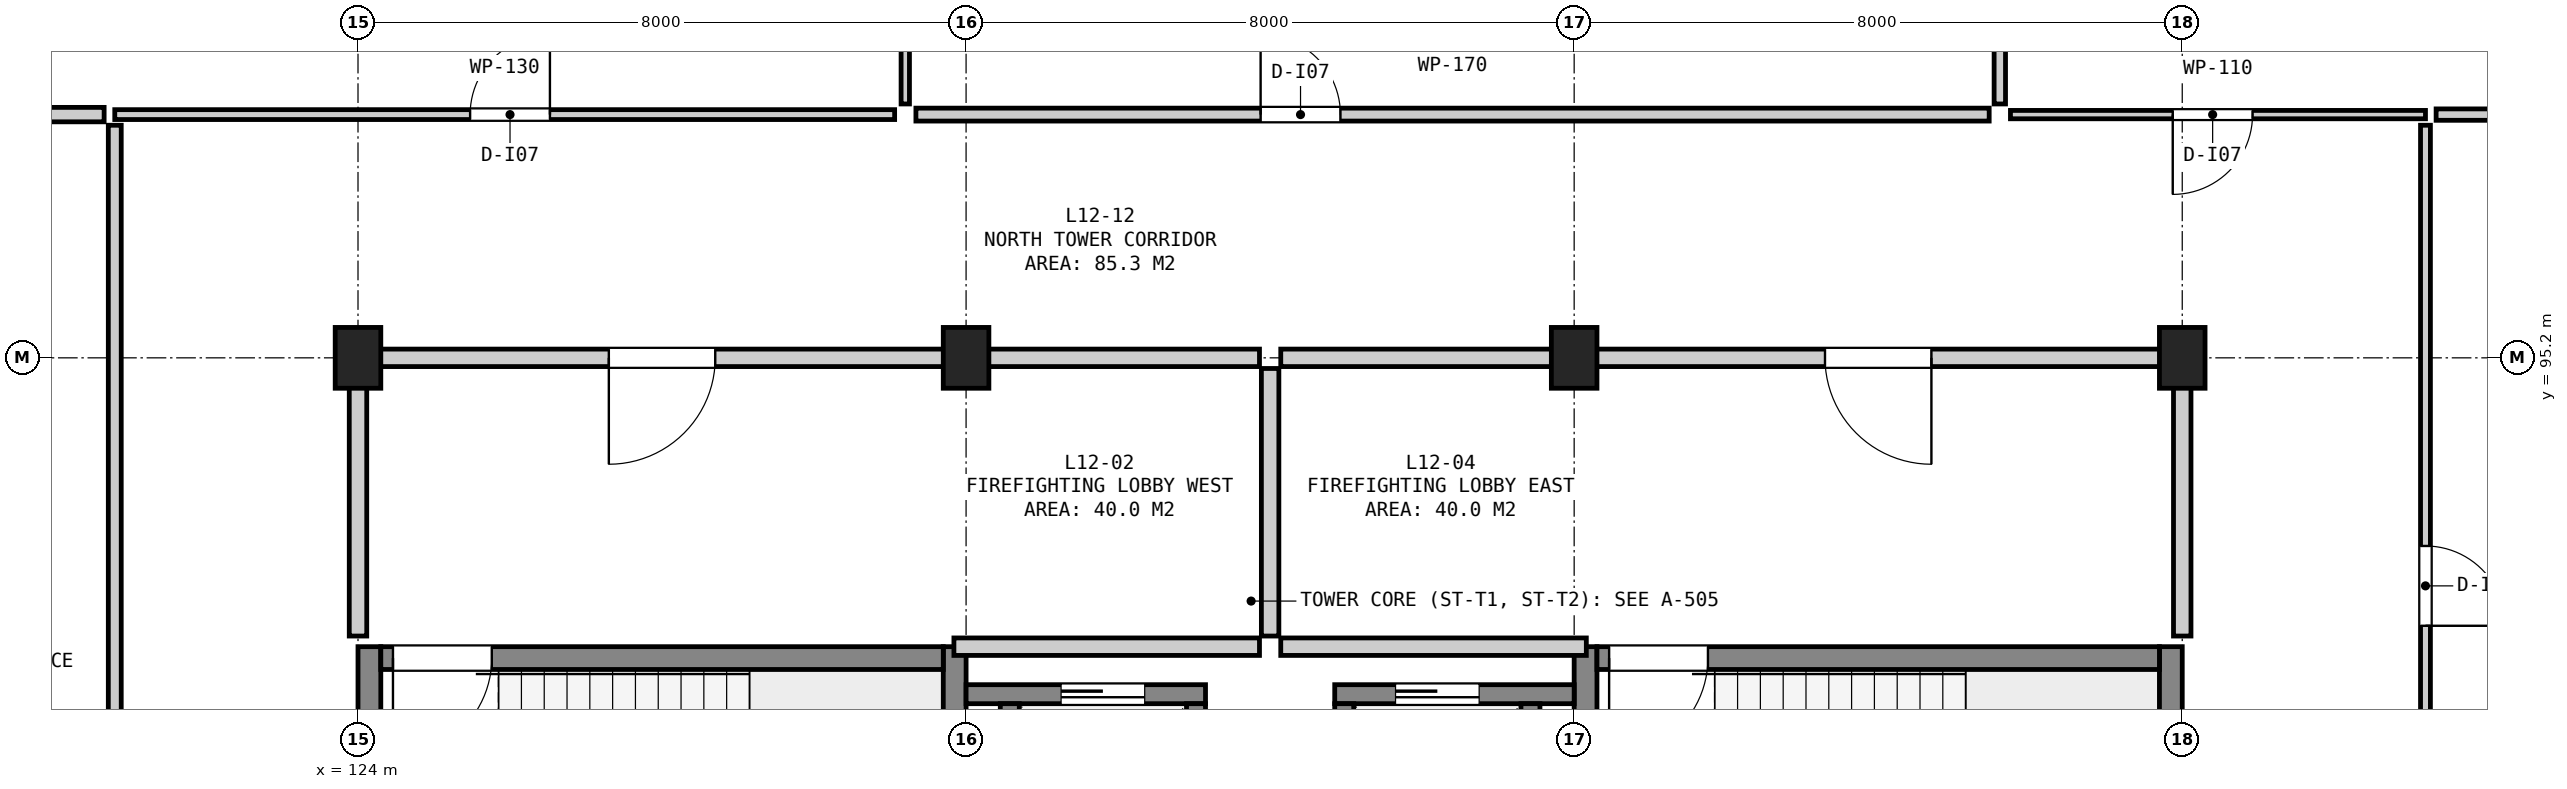
"""IFC4 building model, lengths in metres.
Left out: names, types, materials, properties, quantities, classifications, styles, units other than length and angle.
Written with IfcOpenShell. Run it as: python <this file> out.ifc"""

import sys

from ifc_helpers import new_model, si_unit, direction, frame, frame_2d, origin, origin_2d, place, context, subcontext, project, spatial, rectangle, extrude, element, fill, save


model = new_model("IFC4")
c1 = context("Model", 3, precision=1e-05, world=origin(), true_north=direction((0.0, 1.0)))
c2 = subcontext(c1, "Body", "Model", "MODEL_VIEW")
j1 = project(units=[si_unit("LENGTHUNIT", "METRE"), si_unit("PLANEANGLEUNIT", "RADIAN")], contexts=[c1])
p1 = place(None, origin())
s1 = spatial("IfcSite", under=j1, at=p1, CompositionType="ELEMENT")
p2 = place(p1, origin())
s2 = spatial("IfcBuilding", under=s1, at=p2, CompositionType="ELEMENT")
p3 = place(p2, frame((0.0, 0.0, 50.9)))
s3 = spatial("IfcBuildingStorey", under=s2, at=p3, CompositionType="ELEMENT", Elevation=50.9)
for number, where, z_axis, x_axis in (
    (1, (124.0, 95.2, 0.0), (0.0, 0.0, 1.0), (1.0, 0.0, 0.0)),
    (2, (132.0, 95.2, 0.0), (0.0, 0.0, 1.0), (1.0, 0.0, 0.0)),
    (3, (140.0, 95.2, 0.0), (0.0, 0.0, 1.0), (1.0, 0.0, 0.0)),
    (4, (148.0, 95.2, 0.0), (0.0, 0.0, 1.0), (1.0, 0.0, 0.0)),
):
    element("IfcColumn", number, at=place(p3, frame(where, z_axis=z_axis, x_axis=x_axis)), inside=s3, PredefinedType="COLUMN", context=c2, shape_type="SweptSolid", body=[
        extrude(rectangle(XDim=0.6, YDim=0.8, at=origin_2d()), origin(), (0.0, 0.0, 1.0), 3.9),
    ])
for number, where, z_axis, x_axis in (
    (5, (124.15, 87.2, 0.0), (0.0, 0.0, 1.0), (0.0, 1.0, 0.0)),
    (6, (131.85, 87.2, 0.0), (0.0, 0.0, 1.0), (0.0, 1.0, 0.0)),
):
    element("IfcWall", number, at=place(p3, frame(where, z_axis=z_axis, x_axis=x_axis)), inside=s3, PredefinedType="SHEAR", context=c2, shape_type="SweptSolid", body=[
        extrude(rectangle(XDim=4.2, YDim=0.3, at=frame_2d((2.1, 0.0))), origin(), (0.0, 0.0, 1.0), 3.62),
    ])
p4 = place(p3, frame((124.3, 91.25, 0.0), z_axis=(0.0, 0.0, 1.0), x_axis=(1.0, 0.0, 0.0)))
e7 = element("IfcWall", 7, at=p4, inside=s3, PredefinedType="SHEAR", context=c2, shape_type="SweptSolid", body=[
    extrude(rectangle(XDim=7.4, YDim=0.3, at=frame_2d((3.7, 0.0))), origin(), (0.0, 0.0, 1.0), 3.62),
])
p5 = place(p4, frame((0.16, 0.0, 0.0)))
e8 = element("IfcOpeningElement", 8, at=p5, cuts=e7, PredefinedType="OPENING", context=c2, shape_type="SweptSolid", body=[
    extrude(rectangle(XDim=1.3, YDim=2.18, at=frame_2d((0.65, 1.09))), frame((0.0, 0.162, 0.0), z_axis=(0.0, -1.0, 0.0), x_axis=(1.0, 0.0, 0.0)), (0.0, 0.0, 1.0), 0.324),
])
for number, where, z_axis, x_axis in (
    (9, (140.15, 87.2, 0.0), (0.0, 0.0, 1.0), (0.0, 1.0, 0.0)),
    (10, (147.85, 87.2, 0.0), (0.0, 0.0, 1.0), (0.0, 1.0, 0.0)),
):
    element("IfcWall", number, at=place(p3, frame(where, z_axis=z_axis, x_axis=x_axis)), inside=s3, PredefinedType="SHEAR", context=c2, shape_type="SweptSolid", body=[
        extrude(rectangle(XDim=4.2, YDim=0.3, at=frame_2d((2.1, 0.0))), origin(), (0.0, 0.0, 1.0), 3.62),
    ])
p6 = place(p3, frame((140.3, 91.25, 0.0), z_axis=(0.0, 0.0, 1.0), x_axis=(1.0, 0.0, 0.0)))
e11 = element("IfcWall", 11, at=p6, inside=s3, PredefinedType="SHEAR", context=c2, shape_type="SweptSolid", body=[
    extrude(rectangle(XDim=7.4, YDim=0.3, at=frame_2d((3.7, 0.0))), origin(), (0.0, 0.0, 1.0), 3.62),
])
p7 = place(p6, frame((0.16, 0.0, 0.0)))
e12 = element("IfcOpeningElement", 12, at=p7, cuts=e11, PredefinedType="OPENING", context=c2, shape_type="SweptSolid", body=[
    extrude(rectangle(XDim=1.3, YDim=2.18, at=frame_2d((0.65, 1.09))), frame((0.0, 0.162, 0.0), z_axis=(0.0, -1.0, 0.0), x_axis=(1.0, 0.0, 0.0)), (0.0, 0.0, 1.0), 0.324),
])
p8 = place(p3, frame((132.0, 90.775, 0.0), z_axis=(0.0, 0.0, 1.0), x_axis=(1.0, 0.0, 0.0)))
e13 = element("IfcWall", 13, at=p8, inside=s3, PredefinedType="SHEAR", context=c2, shape_type="SweptSolid", body=[
    extrude(rectangle(XDim=3.15, YDim=0.25, at=frame_2d((1.575, 0.0))), origin(), (0.0, 0.0, 1.0), 3.62),
])
p9 = place(p8, frame((1.25, 0.0, 0.0)))
e14 = element("IfcOpeningElement", 14, at=p9, cuts=e13, PredefinedType="OPENING", context=c2, shape_type="SweptSolid", body=[
    extrude(rectangle(XDim=1.1, YDim=2.15, at=frame_2d((0.55, 1.075))), frame((0.0, 0.137, 0.0), z_axis=(0.0, -1.0, 0.0), x_axis=(1.0, 0.0, 0.0)), (0.0, 0.0, 1.0), 0.274),
])
for number, where, z_axis, x_axis in (
    (15, (132.575, 87.75, 0.0), (0.0, 0.0, 1.0), (0.0, 1.0, 0.0)),
    (16, (135.025, 87.75, 0.0), (0.0, 0.0, 1.0), (0.0, 1.0, 0.0)),
):
    element("IfcWall", number, at=place(p3, frame(where, z_axis=z_axis, x_axis=x_axis)), inside=s3, PredefinedType="SHEAR", context=c2, shape_type="SweptSolid", body=[
        extrude(rectangle(XDim=2.9, YDim=0.25, at=frame_2d((1.45, 0.0))), origin(), (0.0, 0.0, 1.0), 3.62),
    ])
p10 = place(p3, frame((136.85, 90.775, 0.0), z_axis=(0.0, 0.0, 1.0), x_axis=(1.0, 0.0, 0.0)))
e17 = element("IfcWall", 17, at=p10, inside=s3, PredefinedType="SHEAR", context=c2, shape_type="SweptSolid", body=[
    extrude(rectangle(XDim=3.15, YDim=0.25, at=frame_2d((1.575, 0.0))), origin(), (0.0, 0.0, 1.0), 3.62),
])
p11 = place(p10, frame((0.8, 0.0, 0.0)))
e18 = element("IfcOpeningElement", 18, at=p11, cuts=e17, PredefinedType="OPENING", context=c2, shape_type="SweptSolid", body=[
    extrude(rectangle(XDim=1.1, YDim=2.15, at=frame_2d((0.55, 1.075))), frame((0.0, 0.137, 0.0), z_axis=(0.0, -1.0, 0.0), x_axis=(1.0, 0.0, 0.0)), (0.0, 0.0, 1.0), 0.274),
])
for number, where, z_axis, x_axis in (
    (19, (136.975, 87.75, 0.0), (0.0, 0.0, 1.0), (0.0, 1.0, 0.0)),
    (20, (139.425, 87.75, 0.0), (0.0, 0.0, 1.0), (0.0, 1.0, 0.0)),
):
    element("IfcWall", number, at=place(p3, frame(where, z_axis=z_axis, x_axis=x_axis)), inside=s3, PredefinedType="SHEAR", context=c2, shape_type="SweptSolid", body=[
        extrude(rectangle(XDim=2.9, YDim=0.25, at=frame_2d((1.45, 0.0))), origin(), (0.0, 0.0, 1.0), 3.62),
    ])
p12 = place(p3, frame((131.84, 91.4, 0.0), z_axis=(0.0, 0.0, 1.0), x_axis=(1.0, 0.0, 0.0)))
e21 = element("IfcWall", 21, at=p12, inside=s3, PredefinedType="SOLIDWALL", context=c2, shape_type="SweptSolid", body=[
    extrude(rectangle(XDim=4.02, YDim=0.23, at=frame_2d((2.01, 0.0))), origin(), (0.0, 0.0, 1.0), 3.62),
])
p13 = place(p3, frame((124.14, 95.2, 0.0), z_axis=(0.0, 0.0, 1.0), x_axis=(1.0, 0.0, 0.0)))
e22 = element("IfcWall", 22, at=p13, inside=s3, PredefinedType="SOLIDWALL", context=c2, shape_type="SweptSolid", body=[
    extrude(rectangle(XDim=11.72, YDim=0.23, at=frame_2d((5.86, 0.0))), origin(), (0.0, 0.0, 1.0), 3.005),
])
p14 = place(p13, frame((3.16, 0.0, 0.0)))
e23 = element("IfcOpeningElement", 23, at=p14, cuts=e22, PredefinedType="OPENING", context=c2, shape_type="SweptSolid", body=[
    extrude(rectangle(XDim=1.4, YDim=2.2, at=frame_2d((0.7, 1.1))), frame((0.0, 0.127, 0.0), z_axis=(0.0, -1.0, 0.0), x_axis=(1.0, 0.0, 0.0)), (0.0, 0.0, 1.0), 0.254),
])
p15 = place(p3, frame((124.0, 91.54, 0.0), z_axis=(0.0, 0.0, 1.0), x_axis=(0.0, 1.0, 0.0)))
e24 = element("IfcWall", 24, at=p15, inside=s3, PredefinedType="SOLIDWALL", context=c2, shape_type="SweptSolid", body=[
    extrude(rectangle(XDim=3.52, YDim=0.23, at=frame_2d((1.76, 0.0))), origin(), (0.0, 0.0, 1.0), 3.055),
])
p16 = place(p3, frame((136.0, 91.54, 0.0), z_axis=(0.0, 0.0, 1.0), x_axis=(0.0, 1.0, 0.0)))
e25 = element("IfcWall", 25, at=p16, inside=s3, PredefinedType="SOLIDWALL", context=c2, shape_type="SweptSolid", body=[
    extrude(rectangle(XDim=3.52, YDim=0.23, at=frame_2d((1.76, 0.0))), origin(), (0.0, 0.0, 1.0), 3.62),
])
p17 = place(p3, frame((136.14, 91.4, 0.0), z_axis=(0.0, 0.0, 1.0), x_axis=(1.0, 0.0, 0.0)))
e26 = element("IfcWall", 26, at=p17, inside=s3, PredefinedType="SOLIDWALL", context=c2, shape_type="SweptSolid", body=[
    extrude(rectangle(XDim=4.02, YDim=0.23, at=frame_2d((2.01, 0.0))), origin(), (0.0, 0.0, 1.0), 3.62),
])
p18 = place(p3, frame((136.14, 95.2, 0.0), z_axis=(0.0, 0.0, 1.0), x_axis=(1.0, 0.0, 0.0)))
e27 = element("IfcWall", 27, at=p18, inside=s3, PredefinedType="SOLIDWALL", context=c2, shape_type="SweptSolid", body=[
    extrude(rectangle(XDim=11.72, YDim=0.23, at=frame_2d((5.86, 0.0))), origin(), (0.0, 0.0, 1.0), 3.055),
])
p19 = place(p18, frame((7.16, 0.0, 0.0)))
e28 = element("IfcOpeningElement", 28, at=p19, cuts=e27, PredefinedType="OPENING", context=c2, shape_type="SweptSolid", body=[
    extrude(rectangle(XDim=1.4, YDim=2.2, at=frame_2d((0.7, 1.1))), frame((0.0, 0.127, 0.0), z_axis=(0.0, -1.0, 0.0), x_axis=(1.0, 0.0, 0.0)), (0.0, 0.0, 1.0), 0.254),
])
p20 = place(p3, frame((148.0, 91.54, 0.0), z_axis=(0.0, 0.0, 1.0), x_axis=(0.0, 1.0, 0.0)))
e29 = element("IfcWall", 29, at=p20, inside=s3, PredefinedType="SOLIDWALL", context=c2, shape_type="SweptSolid", body=[
    extrude(rectangle(XDim=3.52, YDim=0.23, at=frame_2d((1.76, 0.0))), origin(), (0.0, 0.0, 1.0), 3.155),
])
p21 = place(p3, frame((151.34, 98.4, 0.0), z_axis=(0.0, 0.0, 1.0), x_axis=(1.0, 0.0, 0.0)))
e30 = element("IfcWall", 30, at=p21, inside=s3, PredefinedType="PARTITIONING", context=c2, shape_type="SweptSolid", body=[
    extrude(rectangle(XDim=16.565, YDim=0.15, at=frame_2d((8.282, 0.0))), origin(), (0.0, 0.0, 1.0), 3.62),
])
p22 = place(p3, frame((151.2, 86.54, 0.0), z_axis=(0.0, 0.0, 1.0), x_axis=(0.0, 1.0, 0.0)))
e31 = element("IfcWall", 31, at=p22, inside=s3, PredefinedType="PARTITIONING", context=c2, shape_type="SweptSolid", body=[
    extrude(rectangle(XDim=11.72, YDim=0.13, at=frame_2d((5.86, 0.0))), origin(), (0.0, 0.0, 1.0), 3.62),
])
p23 = place(p22, frame((5.135, 0.0, 0.0)))
e32 = element("IfcOpeningElement", 32, at=p23, cuts=e31, PredefinedType="OPENING", context=c2, shape_type="SweptSolid", body=[
    extrude(rectangle(XDim=1.05, YDim=2.15, at=frame_2d((0.525, 1.075))), frame((0.0, 0.077, 0.0), z_axis=(0.0, -1.0, 0.0), x_axis=(1.0, 0.0, 0.0)), (0.0, 0.0, 1.0), 0.154),
])
p24 = place(p3, frame((116.895, 98.4, 0.0), z_axis=(0.0, 0.0, 1.0), x_axis=(1.0, 0.0, 0.0)))
e33 = element("IfcWall", 33, at=p24, inside=s3, PredefinedType="PARTITIONING", context=c2, shape_type="SweptSolid", body=[
    extrude(rectangle(XDim=3.765, YDim=0.19, at=frame_2d((1.882, 0.0))), origin(), (0.0, 0.0, 1.0), 3.62),
])
p25 = place(p3, frame((120.8, 76.14, 0.0), z_axis=(0.0, 0.0, 1.0), x_axis=(0.0, 1.0, 0.0)))
e34 = element("IfcWall", 34, at=p25, inside=s3, PredefinedType="PARTITIONING", context=c2, shape_type="SweptSolid", body=[
    extrude(rectangle(XDim=22.12, YDim=0.17, at=frame_2d((11.06, 0.0))), origin(), (0.0, 0.0, 1.0), 3.62),
])
p26 = place(p25, frame((6.535, 0.0, 0.0)))
e35 = element("IfcOpeningElement", 35, at=p26, cuts=e34, PredefinedType="OPENING", context=c2, shape_type="SweptSolid", body=[
    extrude(rectangle(XDim=1.05, YDim=2.15, at=frame_2d((0.525, 1.075))), frame((0.0, 0.097, 0.0), z_axis=(0.0, -1.0, 0.0), x_axis=(1.0, 0.0, 0.0)), (0.0, 0.0, 1.0), 0.194),
])
p27 = place(p3, frame((120.8, 98.4, 0.0), z_axis=(0.0, 0.0, 1.0), x_axis=(1.0, 0.0, 0.0)))
e36 = element("IfcWall", 36, at=p27, inside=s3, PredefinedType="PARTITIONING", context=c2, shape_type="SweptSolid", body=[
    extrude(rectangle(XDim=10.26, YDim=0.13, at=frame_2d((5.13, 0.0))), origin(), (0.0, 0.0, 1.0), 3.62),
])
p28 = place(p27, frame((4.675, 0.0, 0.0)))
e37 = element("IfcOpeningElement", 37, at=p28, cuts=e36, PredefinedType="OPENING", context=c2, shape_type="SweptSolid", body=[
    extrude(rectangle(XDim=1.05, YDim=2.15, at=frame_2d((0.525, 1.075))), frame((0.0, 0.077, 0.0), z_axis=(0.0, -1.0, 0.0), x_axis=(1.0, 0.0, 0.0)), (0.0, 0.0, 1.0), 0.154),
])
p29 = place(p3, frame((131.2, 98.54, 0.0), z_axis=(0.0, 0.0, 1.0), x_axis=(0.0, 1.0, 0.0)))
e38 = element("IfcWall", 38, at=p29, inside=s3, PredefinedType="PARTITIONING", context=c2, shape_type="SweptSolid", body=[
    extrude(rectangle(XDim=16.565, YDim=0.11, at=frame_2d((8.282, 0.0))), origin(), (0.0, 0.0, 1.0), 3.62),
])
p30 = place(p3, frame((131.34, 98.4, 0.0), z_axis=(0.0, 0.0, 1.0), x_axis=(1.0, 0.0, 0.0)))
e39 = element("IfcWall", 39, at=p30, inside=s3, PredefinedType="PARTITIONING", context=c2, shape_type="SweptSolid", body=[
    extrude(rectangle(XDim=14.12, YDim=0.17, at=frame_2d((7.06, 0.0))), origin(), (0.0, 0.0, 1.0), 3.62),
])
p31 = place(p30, frame((4.535, 0.0, 0.0)))
e40 = element("IfcOpeningElement", 40, at=p31, cuts=e39, PredefinedType="OPENING", context=c2, shape_type="SweptSolid", body=[
    extrude(rectangle(XDim=1.05, YDim=2.15, at=frame_2d((0.525, 1.075))), frame((0.0, 0.097, 0.0), z_axis=(0.0, -1.0, 0.0), x_axis=(1.0, 0.0, 0.0)), (0.0, 0.0, 1.0), 0.194),
])
p32 = place(p3, frame((145.6, 98.54, 0.0), z_axis=(0.0, 0.0, 1.0), x_axis=(0.0, 1.0, 0.0)))
e41 = element("IfcWall", 41, at=p32, inside=s3, PredefinedType="PARTITIONING", context=c2, shape_type="SweptSolid", body=[
    extrude(rectangle(XDim=16.565, YDim=0.15, at=frame_2d((8.282, 0.0))), origin(), (0.0, 0.0, 1.0), 3.62),
])
p33 = place(p3, frame((145.74, 98.4, 0.0), z_axis=(0.0, 0.0, 1.0), x_axis=(1.0, 0.0, 0.0)))
e42 = element("IfcWall", 42, at=p33, inside=s3, PredefinedType="PARTITIONING", context=c2, shape_type="SweptSolid", body=[
    extrude(rectangle(XDim=5.46, YDim=0.11, at=frame_2d((2.73, 0.0))), origin(), (0.0, 0.0, 1.0), 3.62),
])
p34 = place(p33, frame((2.135, 0.0, 0.0)))
e43 = element("IfcOpeningElement", 43, at=p34, cuts=e42, PredefinedType="OPENING", context=c2, shape_type="SweptSolid", body=[
    extrude(rectangle(XDim=1.05, YDim=2.15, at=frame_2d((0.525, 1.075))), frame((0.0, 0.067, 0.0), z_axis=(0.0, -1.0, 0.0), x_axis=(1.0, 0.0, 0.0)), (0.0, 0.0, 1.0), 0.134),
])
p35 = place(p5, frame((1.3, 0.0, 0.0), z_axis=(0.0, 0.0, 1.0), x_axis=(-1.0, 0.0, 0.0)))
e44 = element("IfcDoor", 44, at=p35, inside=s3, OperationType="SINGLE_SWING_RIGHT", PredefinedType="DOOR", context=c2, shape_type="SweptSolid", body=[
    extrude(rectangle(XDim=1.3, YDim=2.18, at=frame_2d((0.65, 1.09))), frame((0.0, 0.025, 0.0), z_axis=(0.0, -1.0, 0.0), x_axis=(1.0, 0.0, 0.0)), (0.0, 0.0, 1.0), 0.05),
])
fill(e8, e44)
p36 = place(p7, frame((1.3, 0.0, 0.0), z_axis=(0.0, 0.0, 1.0), x_axis=(-1.0, 0.0, 0.0)))
e45 = element("IfcDoor", 45, at=p36, inside=s3, OperationType="SINGLE_SWING_RIGHT", PredefinedType="DOOR", context=c2, shape_type="SweptSolid", body=[
    extrude(rectangle(XDim=1.3, YDim=2.18, at=frame_2d((0.65, 1.09))), frame((0.0, 0.025, 0.0), z_axis=(0.0, -1.0, 0.0), x_axis=(1.0, 0.0, 0.0)), (0.0, 0.0, 1.0), 0.05),
])
fill(e12, e45)
p37 = place(p9, origin())
e46 = element("IfcDoor", 46, at=p37, inside=s3, OperationType="SLIDING_TO_LEFT", PredefinedType="DOOR", context=c2, shape_type="SweptSolid", body=[
    extrude(rectangle(XDim=1.1, YDim=2.15, at=frame_2d((0.55, 1.075))), frame((0.0, 0.025, 0.0), z_axis=(0.0, -1.0, 0.0), x_axis=(1.0, 0.0, 0.0)), (0.0, 0.0, 1.0), 0.05),
])
fill(e14, e46)
p38 = place(p11, origin())
e47 = element("IfcDoor", 47, at=p38, inside=s3, OperationType="SLIDING_TO_LEFT", PredefinedType="DOOR", context=c2, shape_type="SweptSolid", body=[
    extrude(rectangle(XDim=1.1, YDim=2.15, at=frame_2d((0.55, 1.075))), frame((0.0, 0.025, 0.0), z_axis=(0.0, -1.0, 0.0), x_axis=(1.0, 0.0, 0.0)), (0.0, 0.0, 1.0), 0.05),
])
fill(e18, e47)
p39 = place(p14, frame((1.4, 0.0, 0.0), z_axis=(0.0, 0.0, 1.0), x_axis=(-1.0, 0.0, 0.0)))
e48 = element("IfcDoor", 48, at=p39, inside=s3, OperationType="SINGLE_SWING_RIGHT", PredefinedType="DOOR", context=c2, shape_type="SweptSolid", body=[
    extrude(rectangle(XDim=1.4, YDim=2.2, at=frame_2d((0.7, 1.1))), frame((0.0, 0.025, 0.0), z_axis=(0.0, -1.0, 0.0), x_axis=(1.0, 0.0, 0.0)), (0.0, 0.0, 1.0), 0.05),
])
fill(e23, e48)
p40 = place(p19, frame((1.4, 0.0, 0.0), z_axis=(0.0, 0.0, 1.0), x_axis=(-1.0, 0.0, 0.0)))
e49 = element("IfcDoor", 49, at=p40, inside=s3, OperationType="SINGLE_SWING_LEFT", PredefinedType="DOOR", context=c2, shape_type="SweptSolid", body=[
    extrude(rectangle(XDim=1.4, YDim=2.2, at=frame_2d((0.7, 1.1))), frame((0.0, 0.025, 0.0), z_axis=(0.0, -1.0, 0.0), x_axis=(1.0, 0.0, 0.0)), (0.0, 0.0, 1.0), 0.05),
])
fill(e28, e49)
p41 = place(p23, frame((1.05, 0.0, 0.0), z_axis=(0.0, 0.0, 1.0), x_axis=(-1.0, 0.0, 0.0)))
e50 = element("IfcDoor", 50, at=p41, inside=s3, OperationType="SINGLE_SWING_RIGHT", PredefinedType="DOOR", context=c2, shape_type="SweptSolid", body=[
    extrude(rectangle(XDim=1.05, YDim=2.15, at=frame_2d((0.525, 1.075))), frame((0.0, 0.025, 0.0), z_axis=(0.0, -1.0, 0.0), x_axis=(1.0, 0.0, 0.0)), (0.0, 0.0, 1.0), 0.05),
])
fill(e32, e50)
p42 = place(p28, origin())
e51 = element("IfcDoor", 51, at=p42, inside=s3, OperationType="SINGLE_SWING_RIGHT", PredefinedType="DOOR", context=c2, shape_type="SweptSolid", body=[
    extrude(rectangle(XDim=1.05, YDim=2.15, at=frame_2d((0.525, 1.075))), frame((0.0, 0.025, 0.0), z_axis=(0.0, -1.0, 0.0), x_axis=(1.0, 0.0, 0.0)), (0.0, 0.0, 1.0), 0.05),
])
fill(e37, e51)
p43 = place(p31, origin())
e52 = element("IfcDoor", 52, at=p43, inside=s3, OperationType="SINGLE_SWING_LEFT", PredefinedType="DOOR", context=c2, shape_type="SweptSolid", body=[
    extrude(rectangle(XDim=1.05, YDim=2.15, at=frame_2d((0.525, 1.075))), frame((0.0, 0.025, 0.0), z_axis=(0.0, -1.0, 0.0), x_axis=(1.0, 0.0, 0.0)), (0.0, 0.0, 1.0), 0.05),
])
fill(e40, e52)
p44 = place(p34, frame((1.05, 0.0, 0.0), z_axis=(0.0, 0.0, 1.0), x_axis=(-1.0, 0.0, 0.0)))
e53 = element("IfcDoor", 53, at=p44, inside=s3, OperationType="SINGLE_SWING_RIGHT", PredefinedType="DOOR", context=c2, shape_type="SweptSolid", body=[
    extrude(rectangle(XDim=1.05, YDim=2.15, at=frame_2d((0.525, 1.075))), frame((0.0, 0.025, 0.0), z_axis=(0.0, -1.0, 0.0), x_axis=(1.0, 0.0, 0.0)), (0.0, 0.0, 1.0), 0.05),
])
fill(e43, e53)
save(model, sys.argv[1])
